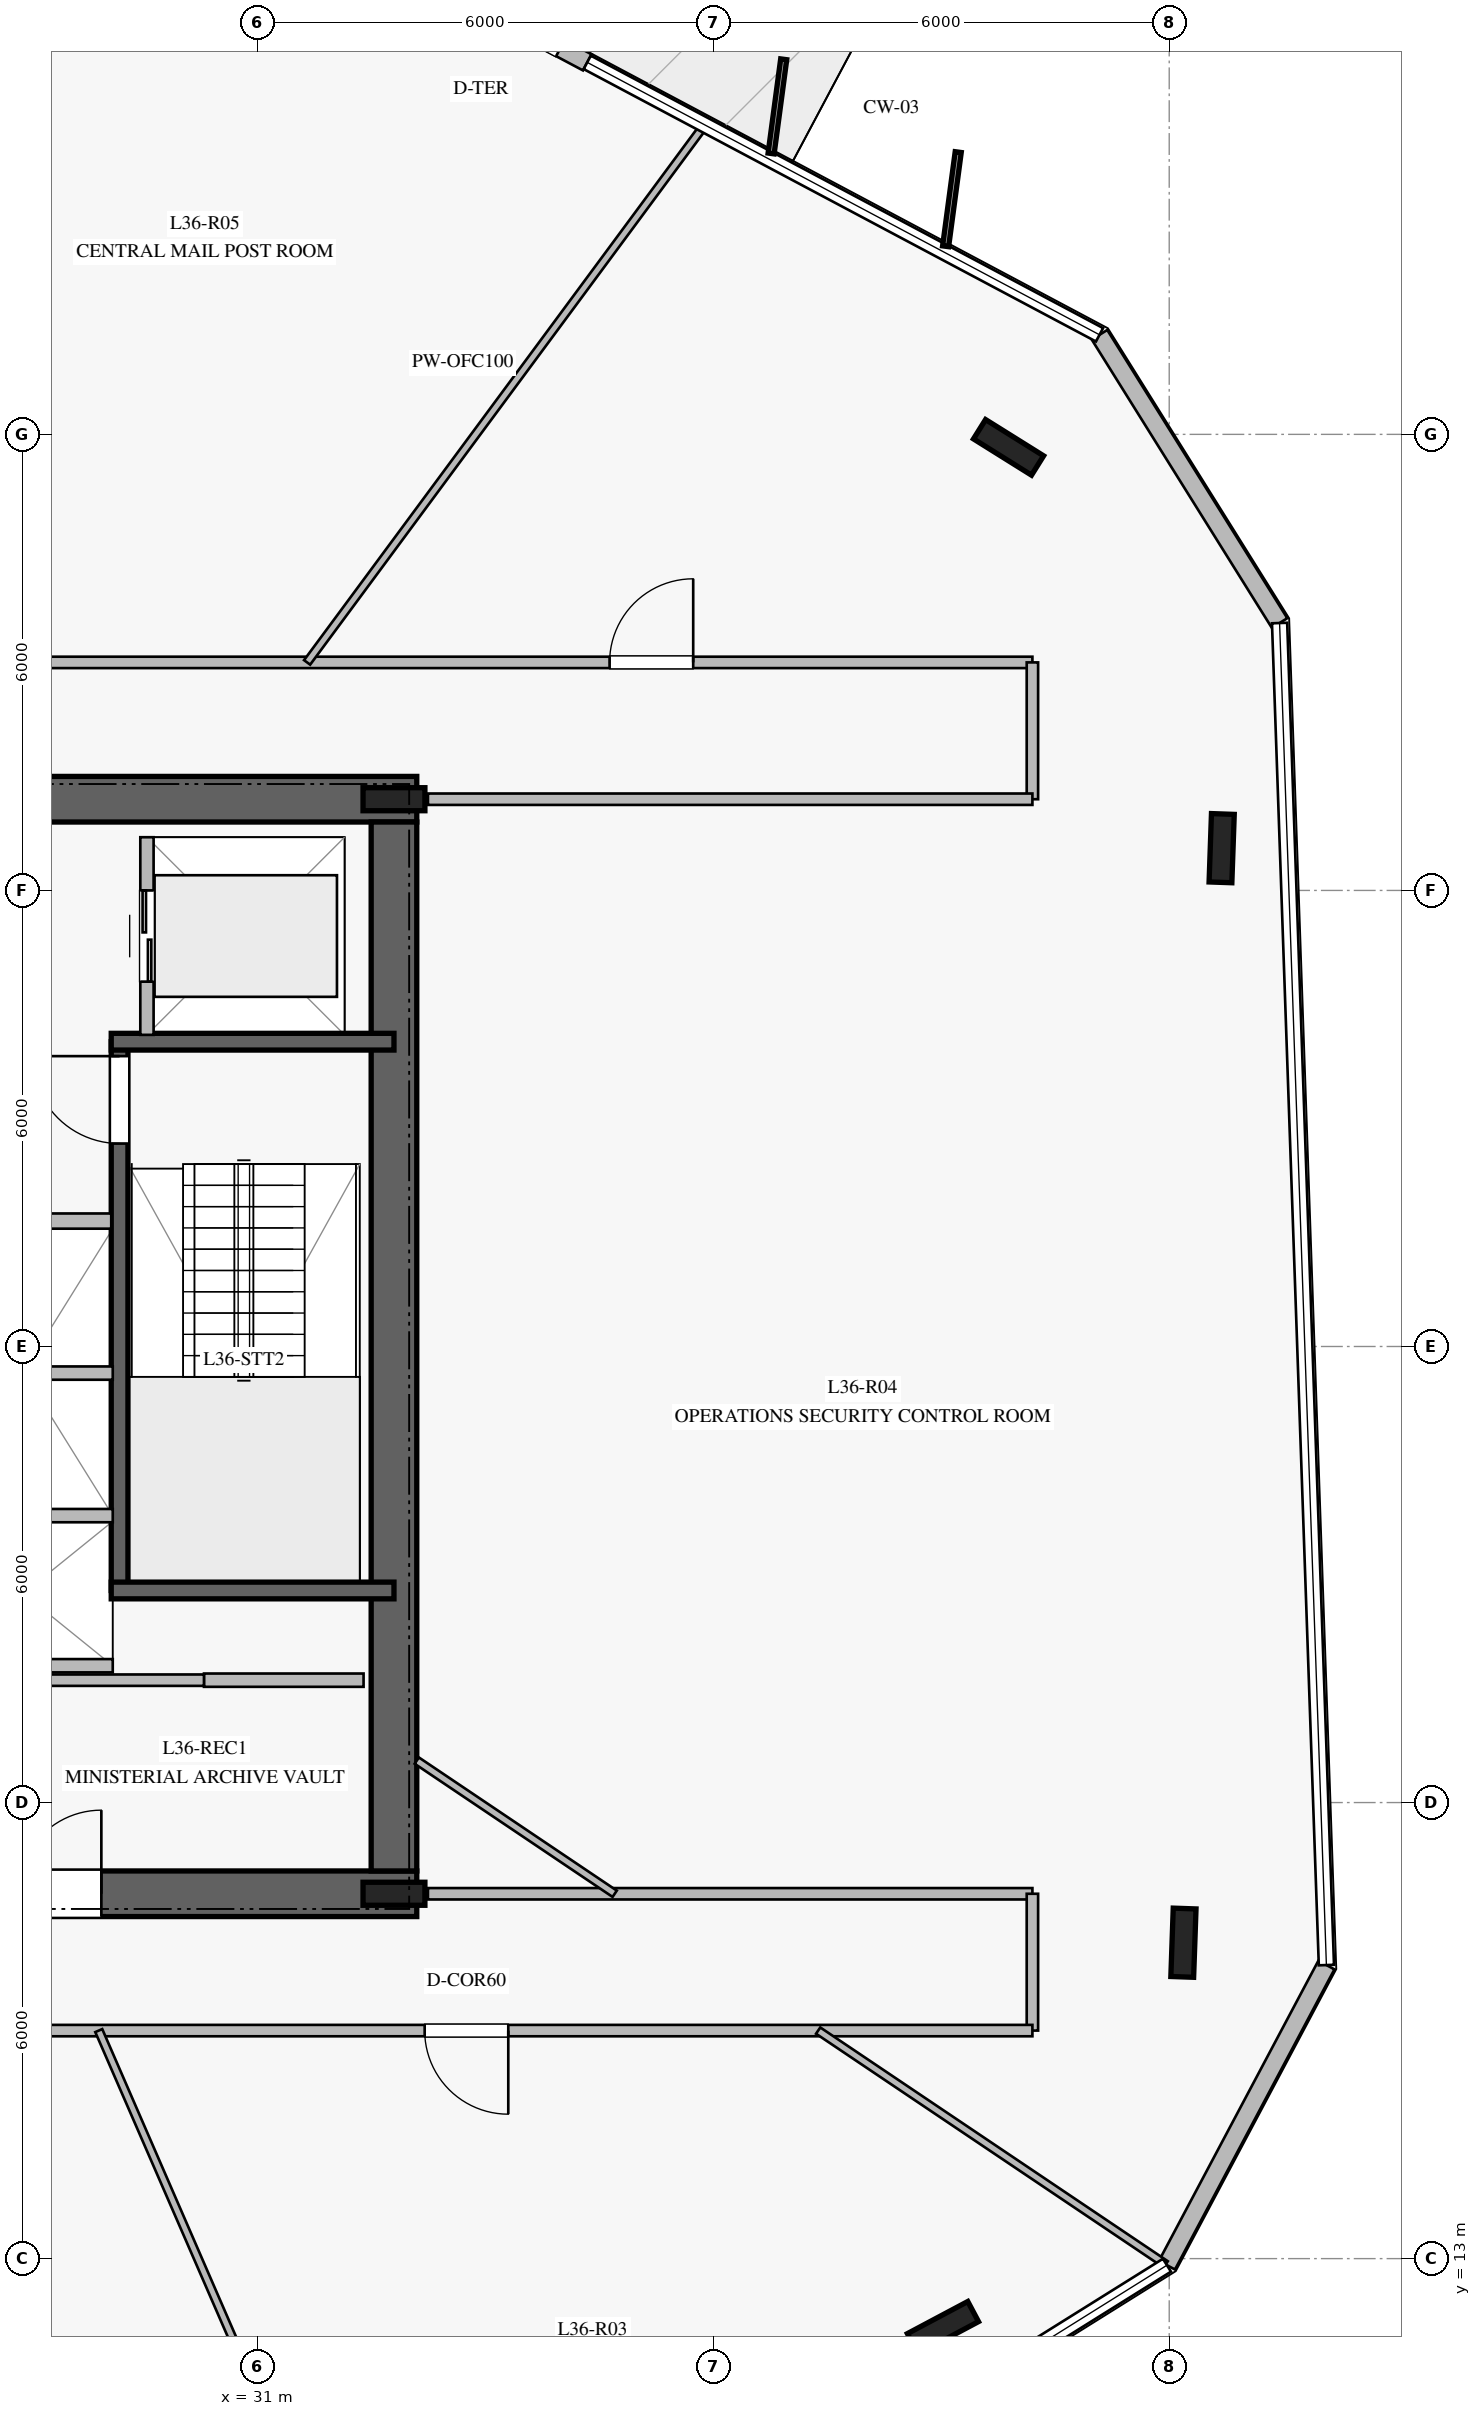
"""IFC4 building model, lengths in metres.
Left out: names, types, materials, properties, quantities, classifications, styles, units other than length and angle.
Written with IfcOpenShell. Run it as: python <this file> out.ifc"""

import sys

from ifc_helpers import new_model, si_unit, direction, frame, frame_2d, origin, origin_2d, place, context, subcontext, project, spatial, rectangle, i_section, extrude, element, fill, save


model = new_model("IFC4")
c1 = context("Model", 3, precision=1e-05, world=origin(), true_north=direction((0.0, 1.0)))
c2 = subcontext(c1, "Body", "Model", "MODEL_VIEW")
j1 = project(units=[si_unit("LENGTHUNIT", "METRE"), si_unit("PLANEANGLEUNIT", "RADIAN")], contexts=[c1])
p1 = place(None, origin())
s1 = spatial("IfcSite", under=j1, at=p1, CompositionType="ELEMENT")
p2 = place(p1, origin())
s2 = spatial("IfcBuilding", under=s1, at=p2, CompositionType="ELEMENT")
p3 = place(p2, frame((0.0, 0.0, 150.4)))
s3 = spatial("IfcBuildingStorey", under=s2, at=p3, CompositionType="ELEMENT", Elevation=150.4)
p4 = place(p3, frame((16.9, 17.8, 0.0), z_axis=(0.0, 0.0, 1.0), x_axis=(1.0, 0.0, 0.0)))
e1 = element("IfcWall", 1, at=p4, inside=s3, PredefinedType="SHEAR", context=c2, shape_type="SweptSolid", body=[
    extrude(rectangle(XDim=16.2, YDim=0.6, at=frame_2d((8.1, 0.0))), origin(), (0.0, 0.0, 1.0), 3.76),
])
p5 = place(p4, frame((5.05, 0.0, 0.0)))
e2 = element("IfcOpeningElement", 2, at=p5, cuts=e1, PredefinedType="OPENING", context=c2, shape_type="SweptSolid", body=[
    extrude(rectangle(XDim=1.2, YDim=2.25, at=frame_2d((0.6, 1.125))), frame((0.0, 0.31, 0.0), z_axis=(0.0, -1.0, 0.0), x_axis=(1.0, 0.0, 0.0)), (0.0, 0.0, 1.0), 0.62),
])
p6 = place(p4, frame((10.95, 0.0, 0.0)))
e3 = element("IfcOpeningElement", 3, at=p6, cuts=e1, PredefinedType="OPENING", context=c2, shape_type="SweptSolid", body=[
    extrude(rectangle(XDim=1.1, YDim=2.2, at=frame_2d((0.55, 1.1))), frame((0.0, 0.31, 0.0), z_axis=(0.0, -1.0, 0.0), x_axis=(1.0, 0.0, 0.0)), (0.0, 0.0, 1.0), 0.62),
])
p7 = place(p3, frame((33.1, 32.2, 0.0), z_axis=(0.0, 0.0, 1.0), x_axis=(-1.0, 0.0, 0.0)))
e4 = element("IfcWall", 4, at=p7, inside=s3, PredefinedType="SHEAR", context=c2, shape_type="SweptSolid", body=[
    extrude(rectangle(XDim=16.2, YDim=0.6, at=frame_2d((8.1, 0.0))), origin(), (0.0, 0.0, 1.0), 3.76),
])
p8 = place(p7, frame((5.05, 0.0, 0.0)))
e5 = element("IfcOpeningElement", 5, at=p8, cuts=e4, PredefinedType="OPENING", context=c2, shape_type="SweptSolid", body=[
    extrude(rectangle(XDim=1.2, YDim=2.25, at=frame_2d((0.6, 1.125))), frame((0.0, 0.31, 0.0), z_axis=(0.0, -1.0, 0.0), x_axis=(1.0, 0.0, 0.0)), (0.0, 0.0, 1.0), 0.62),
])
p9 = place(p7, frame((11.85, 0.0, 0.0)))
e6 = element("IfcOpeningElement", 6, at=p9, cuts=e4, PredefinedType="OPENING", context=c2, shape_type="SweptSolid", body=[
    extrude(rectangle(XDim=1.1, YDim=2.2, at=frame_2d((0.55, 1.1))), frame((0.0, 0.31, 0.0), z_axis=(0.0, -1.0, 0.0), x_axis=(1.0, 0.0, 0.0)), (0.0, 0.0, 1.0), 0.62),
])
p10 = place(p7, frame((9.875, 0.0, 0.0)))
e7 = element("IfcOpeningElement", 7, at=p10, cuts=e4, PredefinedType="OPENING", context=c2, shape_type="SweptSolid", body=[
    extrude(rectangle(XDim=1.1, YDim=2.2, at=frame_2d((0.55, 1.1))), frame((0.0, 0.31, 0.0), z_axis=(0.0, -1.0, 0.0), x_axis=(1.0, 0.0, 0.0)), (0.0, 0.0, 1.0), 0.62),
])
p11 = place(p7, frame((7.9, 0.0, 0.0)))
e8 = element("IfcOpeningElement", 8, at=p11, cuts=e4, PredefinedType="OPENING", context=c2, shape_type="SweptSolid", body=[
    extrude(rectangle(XDim=1.1, YDim=2.2, at=frame_2d((0.55, 1.1))), frame((0.0, 0.31, 0.0), z_axis=(0.0, -1.0, 0.0), x_axis=(1.0, 0.0, 0.0)), (0.0, 0.0, 1.0), 0.62),
])
p12 = place(p3, frame((32.8, 18.1, 0.0), z_axis=(0.0, 0.0, 1.0), x_axis=(0.0, 1.0, 0.0)))
e9 = element("IfcWall", 9, at=p12, inside=s3, PredefinedType="SHEAR", context=c2, shape_type="SweptSolid", body=[
    extrude(rectangle(XDim=13.8, YDim=0.6, at=frame_2d((6.9, 0.0))), origin(), (0.0, 0.0, 1.0), 3.76),
])
for number, where, z_axis, x_axis in (
    (10, (32.8, 17.8, 0.0), (0.0, 0.0, 1.0), (1.0, 0.0, 0.0)),
    (11, (32.8, 32.2, 0.0), (0.0, 0.0, 1.0), (1.0, 0.0, 0.0)),
):
    element("IfcColumn", number, at=place(p3, frame(where, z_axis=z_axis, x_axis=x_axis)), inside=s3, PredefinedType="COLUMN", context=c2, shape_type="SweptSolid", body=[
        extrude(i_section(OverallWidth=0.303, OverallDepth=0.814, WebThickness=0.021, FlangeThickness=0.04, at=origin_2d()), origin(), (0.0, 0.0, 1.0), 4.0),
    ])
p13 = place(p3, frame((29.19, 21.79, 0.0), z_axis=(0.0, 0.0, 1.0), x_axis=(0.0, 1.0, 0.0)))
e12 = element("IfcWall", 12, at=p13, inside=s3, PredefinedType="SOLIDWALL", context=c2, shape_type="SweptSolid", body=[
    extrude(rectangle(XDim=7.22, YDim=0.22, at=frame_2d((3.61, 0.0))), origin(), (0.0, 0.0, 1.0), 3.76),
])
p14 = place(p13, frame((5.88, 0.0, 0.0)))
e13 = element("IfcOpeningElement", 13, at=p14, cuts=e12, PredefinedType="OPENING", context=c2, shape_type="SweptSolid", body=[
    extrude(rectangle(XDim=1.15, YDim=2.2, at=frame_2d((0.575, 1.1))), frame((0.0, 0.12, 0.0), z_axis=(0.0, -1.0, 0.0), x_axis=(1.0, 0.0, 0.0)), (0.0, 0.0, 1.0), 0.24),
])
for number, where, z_axis, x_axis in (
    (14, (29.08, 21.79, 0.0), (0.0, 0.0, 1.0), (1.0, 0.0, 0.0)),
    (15, (29.08, 29.01, 0.0), (0.0, 0.0, 1.0), (1.0, 0.0, 0.0)),
):
    element("IfcWall", number, at=place(p3, frame(where, z_axis=z_axis, x_axis=x_axis)), inside=s3, PredefinedType="SOLIDWALL", context=c2, shape_type="SweptSolid", body=[
        extrude(rectangle(XDim=3.72, YDim=0.22, at=frame_2d((1.86, 0.0))), origin(), (0.0, 0.0, 1.0), 3.76),
    ])
for number, where, z_axis, x_axis in (
    (16, (40.886, 36.829, 0.0), (0.0, 0.0, 1.0), (-0.848, 0.53, 0.0)),
    (17, (40.023, 12.092, 0.0), (0.0, 0.0, 1.0), (0.883, 0.469, 0.0)),
    (18, (43.187, 17.156, 0.0), (0.0, 0.0, 1.0), (0.035, 0.999, 0.0)),
    (19, (43.69, 31.556, 0.0), (0.0, 0.0, 1.0), (0.035, 0.999, 0.0)),
):
    element("IfcColumn", number, at=place(p3, frame(where, z_axis=z_axis, x_axis=x_axis)), inside=s3, PredefinedType="COLUMN", context=c2, shape_type="SweptSolid", body=[
        extrude(i_section(OverallWidth=0.3, OverallDepth=0.9, WebThickness=0.019, FlangeThickness=0.035, at=origin_2d()), origin(), (0.0, 0.0, 1.0), 4.0),
    ])
p15 = place(p3, frame((35.343, 41.894, 0.0), z_axis=(0.0, 0.0, 1.0), x_axis=(-0.883005107209, 0.469363378037, 0.0)))
e20 = element("IfcWall", 20, at=p15, inside=s3, PredefinedType="STANDARD", context=c2, shape_type="SweptSolid", body=[
    extrude(rectangle(XDim=2.401, YDim=0.24, at=frame_2d((1.201, 0.0))), origin(), (0.0, 0.0, 1.0), 3.76),
])
p16 = place(p15, frame((0.4, 0.0, 0.0)))
e21 = element("IfcOpeningElement", 21, at=p16, cuts=e20, PredefinedType="OPENING", context=c2, shape_type="SweptSolid", body=[
    extrude(rectangle(XDim=1.6, YDim=2.25, at=frame_2d((0.8, 1.125))), frame((0.0, 0.13, 0.0), z_axis=(0.0, -1.0, 0.0), x_axis=(1.0, 0.0, 0.0)), (0.0, 0.0, 1.0), 0.26),
])
p17 = place(p3, frame((42.97, 12.913, 0.0), z_axis=(0.0, 0.0, 1.0), x_axis=(0.46919913514, 0.883092391307, 0.0)))
e22 = element("IfcWall", 22, at=p17, inside=s3, PredefinedType="STANDARD", context=c2, shape_type="SweptSolid", body=[
    extrude(rectangle(XDim=4.472, YDim=0.24, at=frame_2d((2.236, 0.0))), origin(), (0.0, 0.0, 1.0), 3.76),
])
p18 = place(p3, frame((44.452, 34.518, 0.0), z_axis=(0.0, 0.0, 1.0), x_axis=(-0.529822232534, 0.848108720573, 0.0)))
e23 = element("IfcWall", 23, at=p18, inside=s3, PredefinedType="STANDARD", context=c2, shape_type="SweptSolid", body=[
    extrude(rectangle(XDim=4.471, YDim=0.24, at=frame_2d((2.236, 0.0))), origin(), (0.0, 0.0, 1.0), 3.76),
])
p19 = place(p3, frame((25.7, 26.65, 0.0), z_axis=(0.0, 0.0, 1.0), x_axis=(1.0, 0.0, 0.0)))
e24 = element("IfcWall", 24, at=p19, inside=s3, PredefinedType="PARTITIONING", context=c2, shape_type="SweptSolid", body=[
    extrude(rectangle(XDim=3.38, YDim=0.2, at=frame_2d((1.69, 0.0))), origin(), (0.0, 0.0, 1.0), 3.76),
])
p20 = place(p3, frame((30.3, 20.61, 0.0), z_axis=(0.0, 0.0, 1.0), x_axis=(1.0, 0.0, 0.0)))
e25 = element("IfcWall", 25, at=p20, inside=s3, PredefinedType="PARTITIONING", context=c2, shape_type="SweptSolid", body=[
    extrude(rectangle(XDim=2.1, YDim=0.175, at=frame_2d((1.05, 0.0))), origin(), (0.0, 0.0, 1.0), 3.76),
])
p21 = place(p3, frame((24.4, 20.61, 0.0), z_axis=(0.0, 0.0, 1.0), x_axis=(1.0, 0.0, 0.0)))
e26 = element("IfcWall", 26, at=p21, inside=s3, PredefinedType="PARTITIONING", context=c2, shape_type="SweptSolid", body=[
    extrude(rectangle(XDim=5.9, YDim=0.15, at=frame_2d((2.95, 0.0))), origin(), (0.0, 0.0, 1.0), 3.76),
])
for number, where, z_axis, x_axis in (
    (27, (26.75, 20.8, 0.0), (0.0, 0.0, 1.0), (1.0, 0.0, 0.0)),
    (28, (26.75, 22.775, 0.0), (0.0, 0.0, 1.0), (1.0, 0.0, 0.0)),
    (29, (26.75, 24.65, 0.0), (0.0, 0.0, 1.0), (1.0, 0.0, 0.0)),
):
    element("IfcWall", number, at=place(p3, frame(where, z_axis=z_axis, x_axis=x_axis)), inside=s3, PredefinedType="PARTITIONING", context=c2, shape_type="SweptSolid", body=[
        extrude(rectangle(XDim=2.35, YDim=0.175, at=frame_2d((1.175, 0.0))), origin(), (0.0, 0.0, 1.0), 3.76),
    ])
p22 = place(p3, frame((29.55, 29.1, 0.0), z_axis=(0.0, 0.0, 1.0), x_axis=(0.0, 1.0, 0.0)))
e30 = element("IfcWall", 30, at=p22, inside=s3, PredefinedType="PARTITIONING", context=c2, shape_type="SweptSolid", body=[
    extrude(rectangle(XDim=2.6, YDim=0.175, at=frame_2d((1.3, 0.0))), origin(), (0.0, 0.0, 1.0), 3.76),
])
p23 = place(p22, frame((0.7, 0.0, 0.0)))
e31 = element("IfcOpeningElement", 31, at=p23, cuts=e30, PredefinedType="OPENING", context=c2, shape_type="SweptSolid", body=[
    extrude(rectangle(XDim=1.2, YDim=2.2, at=frame_2d((0.6, 1.1))), frame((0.0, 0.098, 0.0), z_axis=(0.0, -1.0, 0.0), x_axis=(1.0, 0.0, 0.0)), (0.0, 0.0, 1.0), 0.195),
])
p24 = place(p3, frame((25.95, 34.0, 0.0), z_axis=(0.0, 0.0, 1.0), x_axis=(1.0, 0.0, 0.0)))
e32 = element("IfcWall", 32, at=p24, inside=s3, PredefinedType="PARTITIONING", context=c2, shape_type="SweptSolid", body=[
    extrude(rectangle(XDim=15.25, YDim=0.15, at=frame_2d((7.625, 0.0))), origin(), (0.0, 0.0, 1.0), 3.21),
])
p25 = place(p24, frame((9.687, 0.0, 0.0)))
e33 = element("IfcOpeningElement", 33, at=p25, cuts=e32, PredefinedType="OPENING", context=c2, shape_type="SweptSolid", body=[
    extrude(rectangle(XDim=1.1, YDim=2.2, at=frame_2d((0.55, 1.1))), frame((0.0, 0.085, 0.0), z_axis=(0.0, -1.0, 0.0), x_axis=(1.0, 0.0, 0.0)), (0.0, 0.0, 1.0), 0.17),
])
p26 = place(p3, frame((41.2, 34.0, 0.0), z_axis=(0.0, 0.0, 1.0), x_axis=(0.0, -1.0, 0.0)))
e34 = element("IfcWall", 34, at=p26, inside=s3, PredefinedType="PARTITIONING", context=c2, shape_type="SweptSolid", body=[
    extrude(rectangle(XDim=1.8, YDim=0.15, at=frame_2d((0.9, 0.0))), origin(), (0.0, 0.0, 1.0), 3.76),
])
p27 = place(p3, frame((41.2, 32.2, 0.0), z_axis=(0.0, 0.0, 1.0), x_axis=(-1.0, 0.0, 0.0)))
e35 = element("IfcWall", 35, at=p27, inside=s3, PredefinedType="PARTITIONING", context=c2, shape_type="SweptSolid", body=[
    extrude(rectangle(XDim=7.953, YDim=0.15, at=frame_2d((3.977, 0.0))), origin(), (0.0, 0.0, 1.0), 3.21),
])
p28 = place(p3, frame((33.247, 17.8, 0.0), z_axis=(0.0, 0.0, 1.0), x_axis=(1.0, 0.0, 0.0)))
e36 = element("IfcWall", 36, at=p28, inside=s3, PredefinedType="PARTITIONING", context=c2, shape_type="SweptSolid", body=[
    extrude(rectangle(XDim=7.953, YDim=0.15, at=frame_2d((3.977, 0.0))), origin(), (0.0, 0.0, 1.0), 3.05),
])
p29 = place(p3, frame((41.2, 17.8, 0.0), z_axis=(0.0, 0.0, 1.0), x_axis=(0.0, -1.0, 0.0)))
e37 = element("IfcWall", 37, at=p29, inside=s3, PredefinedType="PARTITIONING", context=c2, shape_type="SweptSolid", body=[
    extrude(rectangle(XDim=1.8, YDim=0.15, at=frame_2d((0.9, 0.0))), origin(), (0.0, 0.0, 1.0), 3.21),
])
p30 = place(p3, frame((41.2, 16.0, 0.0), z_axis=(0.0, 0.0, 1.0), x_axis=(-1.0, 0.0, 0.0)))
e38 = element("IfcWall", 38, at=p30, inside=s3, PredefinedType="PARTITIONING", context=c2, shape_type="SweptSolid", body=[
    extrude(rectangle(XDim=15.25, YDim=0.15, at=frame_2d((7.625, 0.0))), origin(), (0.0, 0.0, 1.0), 3.21),
])
p31 = place(p30, frame((12.932, 0.0, 0.0)))
e39 = element("IfcOpeningElement", 39, at=p31, cuts=e38, PredefinedType="OPENING", context=c2, shape_type="SweptSolid", body=[
    extrude(rectangle(XDim=1.1, YDim=2.2, at=frame_2d((0.55, 1.1))), frame((0.0, 0.085, 0.0), z_axis=(0.0, -1.0, 0.0), x_axis=(1.0, 0.0, 0.0)), (0.0, 0.0, 1.0), 0.17),
])
p32 = place(p30, frame((6.896, 0.0, 0.0)))
e40 = element("IfcOpeningElement", 40, at=p32, cuts=e38, PredefinedType="OPENING", context=c2, shape_type="SweptSolid", body=[
    extrude(rectangle(XDim=1.1, YDim=2.2, at=frame_2d((0.55, 1.1))), frame((0.0, 0.085, 0.0), z_axis=(0.0, -1.0, 0.0), x_axis=(1.0, 0.0, 0.0)), (0.0, 0.0, 1.0), 0.17),
])
p33 = place(p3, frame((31.657, 34.0, 0.0), z_axis=(0.0, 0.0, 1.0), x_axis=(0.594620152086, 0.804006762865, 0.0)))
e41 = element("IfcWall", 41, at=p33, inside=s3, PredefinedType="MOVABLE", context=c2, shape_type="SweptSolid", body=[
    extrude(rectangle(XDim=8.779, YDim=0.1, at=frame_2d((4.389, 0.0))), origin(), (0.0, 0.0, 1.0), 3.16),
])
p34 = place(p3, frame((28.916, 16.0, 0.0), z_axis=(0.0, 0.0, 1.0), x_axis=(0.398858798929, -0.917012354615, 0.0)))
e42 = element("IfcWall", 42, at=p34, inside=s3, PredefinedType="MOVABLE", context=c2, shape_type="SweptSolid", body=[
    extrude(rectangle(XDim=10.159, YDim=0.1, at=frame_2d((5.08, 0.0))), origin(), (0.0, 0.0, 1.0), 3.16),
])
p35 = place(p3, frame((33.1, 19.552, 0.0), z_axis=(0.0, 0.0, 1.0), x_axis=(0.829697218319, -0.55821369198, 0.0)))
e43 = element("IfcWall", 43, at=p35, inside=s3, PredefinedType="MOVABLE", context=c2, shape_type="SweptSolid", body=[
    extrude(rectangle(XDim=3.138, YDim=0.1, at=frame_2d((1.569, 0.0))), origin(), (0.0, 0.0, 1.0), 3.21),
])
p36 = place(p3, frame((38.381, 16.0, 0.0), z_axis=(0.0, 0.0, 1.0), x_axis=(0.829760156415, -0.55812013297, 0.0)))
e44 = element("IfcWall", 44, at=p36, inside=s3, PredefinedType="MOVABLE", context=c2, shape_type="SweptSolid", body=[
    extrude(rectangle(XDim=5.511, YDim=0.1, at=frame_2d((2.756, 0.0))), origin(), (0.0, 0.0, 1.0), 3.16),
])
p37 = place(p14, origin())
e45 = element("IfcDoor", 45, at=p37, inside=s3, OperationType="SINGLE_SWING_RIGHT", PredefinedType="DOOR", context=c2, shape_type="SweptSolid", body=[
    extrude(rectangle(XDim=1.15, YDim=2.2, at=frame_2d((0.575, 1.1))), frame((0.0, 0.025, 0.0), z_axis=(0.0, -1.0, 0.0), x_axis=(1.0, 0.0, 0.0)), (0.0, 0.0, 1.0), 0.05),
])
fill(e13, e45)
p38 = place(p6, origin())
e46 = element("IfcDoor", 46, at=p38, inside=s3, OperationType="SINGLE_SWING_RIGHT", PredefinedType="DOOR", context=c2, shape_type="SweptSolid", body=[
    extrude(rectangle(XDim=1.1, YDim=2.2, at=frame_2d((0.55, 1.1))), frame((0.0, 0.025, 0.0), z_axis=(0.0, -1.0, 0.0), x_axis=(1.0, 0.0, 0.0)), (0.0, 0.0, 1.0), 0.05),
])
fill(e3, e46)
p39 = place(p23, origin())
e47 = element("IfcDoor", 47, at=p39, inside=s3, OperationType="DOUBLE_DOOR_SLIDING", PredefinedType="DOOR", context=c2, shape_type="SweptSolid", body=[
    extrude(rectangle(XDim=1.2, YDim=2.2, at=frame_2d((0.6, 1.1))), frame((0.0, 0.025, 0.0), z_axis=(0.0, -1.0, 0.0), x_axis=(1.0, 0.0, 0.0)), (0.0, 0.0, 1.0), 0.05),
])
fill(e31, e47)
p40 = place(p32, origin())
e48 = element("IfcDoor", 48, at=p40, inside=s3, OperationType="SINGLE_SWING_LEFT", PredefinedType="DOOR", context=c2, shape_type="SweptSolid", body=[
    extrude(rectangle(XDim=1.1, YDim=2.2, at=frame_2d((0.55, 1.1))), frame((0.0, 0.025, 0.0), z_axis=(0.0, -1.0, 0.0), x_axis=(1.0, 0.0, 0.0)), (0.0, 0.0, 1.0), 0.05),
])
fill(e40, e48)
p41 = place(p25, origin())
e49 = element("IfcDoor", 49, at=p41, inside=s3, OperationType="SINGLE_SWING_RIGHT", PredefinedType="DOOR", context=c2, shape_type="SweptSolid", body=[
    extrude(rectangle(XDim=1.1, YDim=2.2, at=frame_2d((0.55, 1.1))), frame((0.0, 0.025, 0.0), z_axis=(0.0, -1.0, 0.0), x_axis=(1.0, 0.0, 0.0)), (0.0, 0.0, 1.0), 0.05),
])
fill(e33, e49)
save(model, sys.argv[1])
